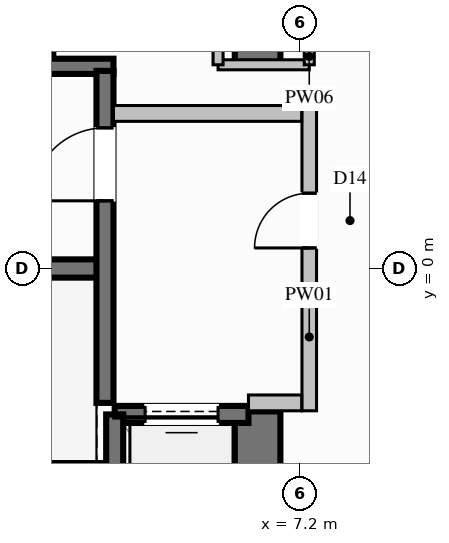
"""IFC4 building model, lengths in metres.
Left out: names, types, materials, properties, quantities, classifications, styles, units other than length and angle.
Written with IfcOpenShell. Run it as: python <this file> out.ifc"""

import sys

from ifc_helpers import new_model, si_unit, direction, frame, frame_2d, origin, place, context, subcontext, project, spatial, rectangle, extrude, element, fill, save


model = new_model("IFC4")
c1 = context("Model", 3, precision=1e-05, world=origin(), true_north=direction((0.0, 1.0)))
c2 = subcontext(c1, "Body", "Model", "MODEL_VIEW")
j1 = project(units=[si_unit("LENGTHUNIT", "METRE"), si_unit("PLANEANGLEUNIT", "RADIAN")], contexts=[c1])
p1 = place(None, origin())
s1 = spatial("IfcSite", under=j1, at=p1, CompositionType="ELEMENT")
p2 = place(p1, origin())
s2 = spatial("IfcBuilding", under=s1, at=p2, CompositionType="ELEMENT")
p3 = place(p2, frame((0.0, 0.0, 89.6)))
s3 = spatial("IfcBuildingStorey", under=s2, at=p3, CompositionType="ELEMENT", Elevation=89.6)
p4 = place(p3, frame((-3.99, 0.0, 0.0), z_axis=(0.0, 0.0, 1.0), x_axis=(1.0, 0.0, 0.0)))
e1 = element("IfcWall", 1, at=p4, inside=s3, PredefinedType="SHEAR", context=c2, shape_type="SweptSolid", body=[
    extrude(rectangle(XDim=7.98, YDim=0.3, at=frame_2d((3.99, 0.0))), origin(), (0.0, 0.0, 1.0), 3.6),
])
for number, where, z_axis, x_axis in (
    (2, (-4.13, -3.325, 0.0), (0.0, 0.0, 1.0), (1.0, 0.0, 0.0)),
    (3, (-4.13, 3.325, 0.0), (0.0, 0.0, 1.0), (1.0, 0.0, 0.0)),
):
    element("IfcWall", number, at=place(p3, frame(where, z_axis=z_axis, x_axis=x_axis)), inside=s3, PredefinedType="SOLIDWALL", context=c2, shape_type="SweptSolid", body=[
        extrude(rectangle(XDim=8.26, YDim=0.25, at=frame_2d((4.13, 0.0))), origin(), (0.0, 0.0, 1.0), 3.6),
    ])
p5 = place(p3, frame((6.5, -6.475, 0.0), z_axis=(0.0, 0.0, 1.0), x_axis=(0.0, 1.0, 0.0)))
e4 = element("IfcWall", 4, at=p5, inside=s3, PredefinedType="SHEAR", context=c2, shape_type="SweptSolid", body=[
    extrude(rectangle(XDim=4.125, YDim=0.75, at=frame_2d((2.062, 0.0))), origin(), (0.0, 0.0, 1.0), 3.6),
])
p6 = place(p3, frame((6.5, 3.35, 0.0), z_axis=(0.0, 0.0, 1.0), x_axis=(0.0, 1.0, 0.0)))
e5 = element("IfcWall", 5, at=p6, inside=s3, PredefinedType="SHEAR", context=c2, shape_type="SweptSolid", body=[
    extrude(rectangle(XDim=3.125, YDim=0.75, at=frame_2d((1.562, 0.0))), origin(), (0.0, 0.0, 1.0), 3.6),
])
p7 = place(p3, frame((3.0, 3.5, 0.0), z_axis=(0.0, 0.0, 1.0), x_axis=(0.0, 1.0, 0.0)))
e6 = element("IfcWall", 6, at=p7, inside=s3, PredefinedType="SOLIDWALL", context=c2, shape_type="SweptSolid", body=[
    extrude(rectangle(XDim=2.5, YDim=0.28, at=frame_2d((1.25, 0.0))), origin(), (0.0, 0.0, 1.0), 3.2),
])
p8 = place(p3, frame((6.35, -2.4, 0.0), z_axis=(0.0, 0.0, 1.0), x_axis=(-1.0, 0.0, 0.0)))
e7 = element("IfcWall", 7, at=p8, inside=s3, PredefinedType="SOLIDWALL", context=c2, shape_type="SweptSolid", body=[
    extrude(rectangle(XDim=2.2, YDim=0.28, at=frame_2d((1.1, 0.0))), origin(), (0.0, 0.0, 1.0), 3.2),
])
p9 = place(p8, frame((0.5, 0.0, 0.0)))
e8 = element("IfcOpeningElement", 8, at=p9, cuts=e7, PredefinedType="OPENING", context=c2, shape_type="SweptSolid", body=[
    extrude(rectangle(XDim=1.2, YDim=2.2, at=frame_2d((0.6, 1.1))), frame((0.0, 0.15, 0.0), z_axis=(0.0, -1.0, 0.0), x_axis=(1.0, 0.0, 0.0)), (0.0, 0.0, 1.0), 0.3),
])
p10 = place(p3, frame((4.15, -2.4, 0.0), z_axis=(0.0, 0.0, 1.0), x_axis=(0.0, -1.0, 0.0)))
e9 = element("IfcWall", 9, at=p10, inside=s3, PredefinedType="SOLIDWALL", context=c2, shape_type="SweptSolid", body=[
    extrude(rectangle(XDim=2.7, YDim=0.28, at=frame_2d((1.35, 0.0))), origin(), (0.0, 0.0, 1.0), 3.2),
])
p11 = place(p3, frame((3.99, -2.21, 0.0), z_axis=(0.0, 0.0, 1.0), x_axis=(0.0, 1.0, 0.0)))
e10 = element("IfcWall", 10, at=p11, inside=s3, PredefinedType="SOLIDWALL", context=c2, shape_type="SweptSolid", body=[
    extrude(rectangle(XDim=5.46, YDim=0.28, at=frame_2d((2.73, 0.0))), origin(), (0.0, 0.0, 1.0), 3.2),
])
p12 = place(p11, frame((3.323, 0.0, 0.0)))
e11 = element("IfcOpeningElement", 11, at=p12, cuts=e10, PredefinedType="OPENING", context=c2, shape_type="SweptSolid", body=[
    extrude(rectangle(XDim=1.2, YDim=2.2, at=frame_2d((0.6, 1.1))), frame((0.0, 0.15, 0.0), z_axis=(0.0, -1.0, 0.0), x_axis=(1.0, 0.0, 0.0)), (0.0, 0.0, 1.0), 0.3),
])
p13 = place(p3, frame((7.35, -2.34, 0.0), z_axis=(0.0, 0.0, 1.0), x_axis=(0.0, 1.0, 0.0)))
e12 = element("IfcWall", 12, at=p13, inside=s3, PredefinedType="PARTITIONING", context=c2, shape_type="SweptSolid", body=[
    extrude(rectangle(XDim=5.02, YDim=0.24, at=frame_2d((2.51, 0.0))), origin(), (0.0, 0.0, 1.0), 3.2),
])
p14 = place(p13, frame((2.678, 0.0, 0.0)))
e13 = element("IfcOpeningElement", 13, at=p14, cuts=e12, PredefinedType="OPENING", context=c2, shape_type="SweptSolid", body=[
    extrude(rectangle(XDim=0.9, YDim=2.02, at=frame_2d((0.45, 1.01))), frame((0.0, 0.13, 0.0), z_axis=(0.0, -1.0, 0.0), x_axis=(1.0, 0.0, 0.0)), (0.0, 0.0, 1.0), 0.26),
])
p15 = place(p3, frame((6.35, -2.21, 0.0), z_axis=(0.0, 0.0, 1.0), x_axis=(1.0, 0.0, 0.0)))
e14 = element("IfcWall", 14, at=p15, inside=s3, PredefinedType="PARTITIONING", context=c2, shape_type="SweptSolid", body=[
    extrude(rectangle(XDim=0.875, YDim=0.26, at=frame_2d((0.438, 0.0))), origin(), (0.0, 0.0, 1.0), 3.2),
])
p16 = place(p3, frame((4.13, 2.55, 0.0), z_axis=(0.0, 0.0, 1.0), x_axis=(1.0, 0.0, 0.0)))
e15 = element("IfcWall", 15, at=p16, inside=s3, PredefinedType="PARTITIONING", context=c2, shape_type="SweptSolid", body=[
    extrude(rectangle(XDim=3.095, YDim=0.26, at=frame_2d((1.548, 0.0))), origin(), (0.0, 0.0, 1.0), 3.2),
])
p17 = place(p3, frame((5.85, 3.35, 0.0), z_axis=(0.0, 0.0, 1.0), x_axis=(1.0, 0.0, 0.0)))
e16 = element("IfcWall", 16, at=p17, inside=s3, PredefinedType="PARTITIONING", context=c2, shape_type="SweptSolid", body=[
    extrude(rectangle(XDim=1.5, YDim=0.165, at=frame_2d((0.75, 0.0))), origin(), (0.0, 0.0, 1.0), 3.2),
])
p18 = place(p3, frame((7.35, 3.35, 0.0), z_axis=(0.0, 0.0, 1.0), x_axis=(0.0, 1.0, 0.0)))
e17 = element("IfcWall", 17, at=p18, inside=s3, PredefinedType="PARTITIONING", context=c2, shape_type="SweptSolid", body=[
    extrude(rectangle(XDim=1.95, YDim=0.165, at=frame_2d((0.975, 0.0))), origin(), (0.0, 0.0, 1.0), 3.2),
])
p19 = place(p18, frame((0.525, 0.0, 0.0)))
e18 = element("IfcOpeningElement", 18, at=p19, cuts=e17, PredefinedType="OPENING", context=c2, shape_type="SweptSolid", body=[
    extrude(rectangle(XDim=0.9, YDim=2.02, at=frame_2d((0.45, 1.01))), frame((0.0, 0.093, 0.0), z_axis=(0.0, -1.0, 0.0), x_axis=(1.0, 0.0, 0.0)), (0.0, 0.0, 1.0), 0.185),
])
p20 = place(p3, frame((5.85, 5.3, 0.0), z_axis=(0.0, 0.0, 1.0), x_axis=(0.0, -1.0, 0.0)))
e19 = element("IfcWall", 19, at=p20, inside=s3, PredefinedType="PARTITIONING", context=c2, shape_type="SweptSolid", body=[
    extrude(rectangle(XDim=1.95, YDim=0.165, at=frame_2d((0.975, 0.0))), origin(), (0.0, 0.0, 1.0), 2.067),
])
p21 = place(p9, origin())
e20 = element("IfcDoor", 20, at=p21, inside=s3, OperationType="SLIDING_TO_LEFT", PredefinedType="DOOR", context=c2, shape_type="SweptSolid", body=[
    extrude(rectangle(XDim=1.2, YDim=2.2, at=frame_2d((0.6, 1.1))), frame((0.0, 0.025, 0.0), z_axis=(0.0, -1.0, 0.0), x_axis=(1.0, 0.0, 0.0)), (0.0, 0.0, 1.0), 0.05),
])
fill(e8, e20)
p22 = place(p12, origin())
e21 = element("IfcDoor", 21, at=p22, inside=s3, OperationType="SINGLE_SWING_LEFT", PredefinedType="DOOR", context=c2, shape_type="SweptSolid", body=[
    extrude(rectangle(XDim=1.2, YDim=2.2, at=frame_2d((0.6, 1.1))), frame((0.0, 0.025, 0.0), z_axis=(0.0, -1.0, 0.0), x_axis=(1.0, 0.0, 0.0)), (0.0, 0.0, 1.0), 0.05),
])
fill(e11, e21)
p23 = place(p14, origin())
e22 = element("IfcDoor", 22, at=p23, inside=s3, OperationType="SINGLE_SWING_LEFT", PredefinedType="DOOR", context=c2, shape_type="SweptSolid", body=[
    extrude(rectangle(XDim=0.9, YDim=2.02, at=frame_2d((0.45, 1.01))), frame((0.0, 0.025, 0.0), z_axis=(0.0, -1.0, 0.0), x_axis=(1.0, 0.0, 0.0)), (0.0, 0.0, 1.0), 0.05),
])
fill(e13, e22)
save(model, sys.argv[1])
